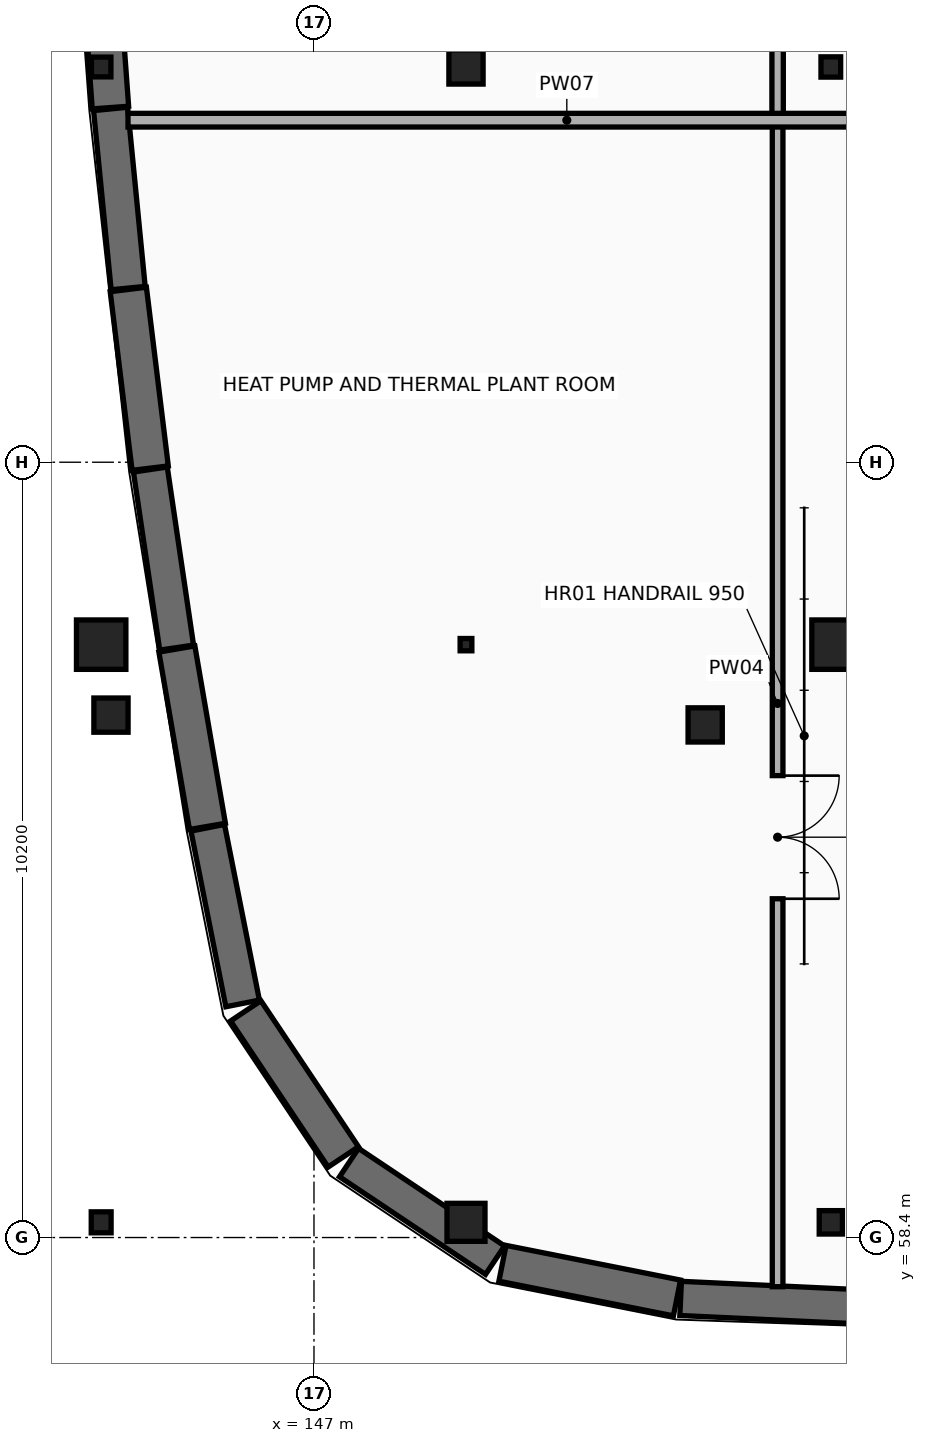
"""IFC4 building model, lengths in metres.
Left out: names, types, materials, properties, quantities, classifications, styles, units other than length and angle.
Written with IfcOpenShell. Run it as: python <this file> out.ifc"""

import sys

from ifc_helpers import new_model, si_unit, direction, frame, frame_2d, origin, origin_2d, place, context, subcontext, project, spatial, rectangle, i_section, extrude, element, fill, save


model = new_model("IFC4")
c1 = context("Model", 3, precision=1e-05, world=origin(), true_north=direction((0.0, 1.0)))
c2 = subcontext(c1, "Body", "Model", "MODEL_VIEW")
j1 = project(units=[si_unit("LENGTHUNIT", "METRE"), si_unit("PLANEANGLEUNIT", "RADIAN")], contexts=[c1])
p1 = place(None, origin())
s1 = spatial("IfcSite", under=j1, at=p1, CompositionType="ELEMENT")
p2 = place(p1, origin())
s2 = spatial("IfcBuilding", under=s1, at=p2, CompositionType="ELEMENT")
p3 = place(p2, frame((0.0, 0.0, -4.2)))
s3 = spatial("IfcBuildingStorey", under=s2, at=p3, CompositionType="ELEMENT", Elevation=-4.2)
p4 = place(p3, frame((144.2, 58.6, -0.415), z_axis=(0.0, 0.0, 1.0), x_axis=(1.0, 0.0, 0.0)))
e1 = element("IfcColumn", 1, at=p4, inside=s3, PredefinedType="COLUMN", context=c2, shape_type="SweptSolid", body=[
    extrude(i_section(OverallWidth=0.261, OverallDepth=0.276, WebThickness=0.015, FlangeThickness=0.025, at=origin_2d()), origin(), (0.0, 0.0, 1.0), 4.615),
])
p5 = place(p3, frame((144.2, 66.2, -0.415), z_axis=(0.0, 0.0, 1.0), x_axis=(1.0, 0.0, 0.0)))
e2 = element("IfcColumn", 2, at=p5, inside=s3, PredefinedType="COLUMN", context=c2, shape_type="SweptSolid", body=[
    extrude(rectangle(XDim=0.65, YDim=0.65, at=origin_2d()), origin(), (0.0, 0.0, 1.0), 4.615),
])
p6 = place(p3, frame((144.2, 73.8, -0.415), z_axis=(0.0, 0.0, 1.0), x_axis=(1.0, 0.0, 0.0)))
e3 = element("IfcColumn", 3, at=p6, inside=s3, PredefinedType="COLUMN", context=c2, shape_type="SweptSolid", body=[
    extrude(i_section(OverallWidth=0.256, OverallDepth=0.26, WebThickness=0.01, FlangeThickness=0.017, at=origin_2d()), origin(), (0.0, 0.0, 1.0), 4.615),
])
p7 = place(p3, frame((149.0, 58.6, -0.415), z_axis=(0.0, 0.0, 1.0), x_axis=(1.0, 0.0, 0.0)))
e4 = element("IfcColumn", 4, at=p7, inside=s3, PredefinedType="COLUMN", context=c2, shape_type="SweptSolid", body=[
    extrude(rectangle(XDim=0.5, YDim=0.5, at=origin_2d()), origin(), (0.0, 0.0, 1.0), 4.615),
])
p8 = place(p3, frame((149.0, 66.2, -0.415), z_axis=(0.0, 0.0, 1.0), x_axis=(1.0, 0.0, 0.0)))
e5 = element("IfcColumn", 5, at=p8, inside=s3, PredefinedType="COLUMN", context=c2, shape_type="SweptSolid", body=[
    extrude(i_section(OverallWidth=0.154, OverallDepth=0.162, WebThickness=0.008, FlangeThickness=0.011, at=origin_2d()), origin(), (0.0, 0.0, 1.0), 4.615),
])
p9 = place(p3, frame((149.0, 73.8, -0.415), z_axis=(0.0, 0.0, 1.0), x_axis=(1.0, 0.0, 0.0)))
e6 = element("IfcColumn", 6, at=p9, inside=s3, PredefinedType="COLUMN", context=c2, shape_type="SweptSolid", body=[
    extrude(rectangle(XDim=0.45, YDim=0.45, at=origin_2d()), origin(), (0.0, 0.0, 1.0), 4.615),
])
p10 = place(p3, frame((153.8, 58.6, -0.415), z_axis=(0.0, 0.0, 1.0), x_axis=(1.0, 0.0, 0.0)))
e7 = element("IfcColumn", 7, at=p10, inside=s3, PredefinedType="COLUMN", context=c2, shape_type="SweptSolid", body=[
    extrude(i_section(OverallWidth=0.305, OverallDepth=0.308, WebThickness=0.01, FlangeThickness=0.015, at=origin_2d()), origin(), (0.0, 0.0, 1.0), 4.615),
])
p11 = place(p3, frame((153.8, 66.2, -0.415), z_axis=(0.0, 0.0, 1.0), x_axis=(1.0, 0.0, 0.0)))
e8 = element("IfcColumn", 8, at=p11, inside=s3, PredefinedType="COLUMN", context=c2, shape_type="SweptSolid", body=[
    extrude(rectangle(XDim=0.5, YDim=0.65, at=origin_2d()), origin(), (0.0, 0.0, 1.0), 4.615),
])
p12 = place(p3, frame((153.8, 73.8, -0.415), z_axis=(0.0, 0.0, 1.0), x_axis=(1.0, 0.0, 0.0)))
e9 = element("IfcColumn", 9, at=p12, inside=s3, PredefinedType="COLUMN", context=c2, shape_type="SweptSolid", body=[
    extrude(i_section(OverallWidth=0.259, OverallDepth=0.267, WebThickness=0.013, FlangeThickness=0.021, at=origin_2d()), origin(), (0.0, 0.0, 1.0), 4.615),
])
for number, where, z_axis, x_axis in (
    (10, (144.329, 65.273, -0.415), (0.0, 0.0, 1.0), (1.0, 0.0, 0.0)),
    (11, (152.147, 65.144, -0.415), (0.0, 0.0, 1.0), (1.0, 0.0, 0.0)),
):
    element("IfcColumn", number, at=place(p3, frame(where, z_axis=z_axis, x_axis=x_axis)), inside=s3, PredefinedType="COLUMN", context=c2, shape_type="SweptSolid", body=[
        extrude(rectangle(XDim=0.45, YDim=0.45, at=origin_2d()), origin(), (0.0, 0.0, 1.0), 4.615),
    ])
p13 = place(p3, frame((154.11, 57.492, 0.0), z_axis=(0.0, 0.0, 1.0), x_axis=(-0.998902862509, 0.046830238855, 0.0)))
e12 = element("IfcWall", 12, at=p13, inside=s3, PredefinedType="STANDARD", context=c2, shape_type="SweptSolid", body=[
    extrude(rectangle(XDim=2.289, YDim=0.45, at=frame_2d((1.144, 0.0))), origin(), (0.0, 0.0, 1.0), 3.882),
])
p14 = place(p3, frame((144.322, 73.266, 0.0), z_axis=(0.0, 0.0, 1.0), x_axis=(-0.07309318863, 0.997325115384, 0.0)))
e13 = element("IfcWall", 13, at=p14, inside=s3, PredefinedType="STANDARD", context=c2, shape_type="SweptSolid", body=[
    extrude(rectangle(XDim=2.368, YDim=0.48, at=frame_2d((1.184, 0.0))), origin(), (0.0, 0.0, 1.0), 3.882),
])
p15 = place(p3, frame((144.555, 70.891, 0.0), z_axis=(0.0, 0.0, 1.0), x_axis=(-0.097523372714, 0.995233234862, 0.0)))
e14 = element("IfcWall", 14, at=p15, inside=s3, PredefinedType="STANDARD", context=c2, shape_type="SweptSolid", body=[
    extrude(rectangle(XDim=2.368, YDim=0.45, at=frame_2d((1.184, 0.0))), origin(), (0.0, 0.0, 1.0), 3.882),
])
p16 = place(p3, frame((144.845, 68.522, 0.0), z_axis=(0.0, 0.0, 1.0), x_axis=(-0.121624086898, 0.992576234597, 0.0)))
e15 = element("IfcWall", 15, at=p16, inside=s3, PredefinedType="STANDARD", context=c2, shape_type="SweptSolid", body=[
    extrude(rectangle(XDim=2.369, YDim=0.48, at=frame_2d((1.184, 0.0))), origin(), (0.0, 0.0, 1.0), 3.882),
])
p17 = place(p3, frame((145.193, 66.161, 0.0), z_axis=(0.0, 0.0, 1.0), x_axis=(-0.146167599706, 0.989259840889, 0.0)))
e16 = element("IfcWall", 16, at=p17, inside=s3, PredefinedType="STANDARD", context=c2, shape_type="SweptSolid", body=[
    extrude(rectangle(XDim=2.368, YDim=0.45, at=frame_2d((1.184, 0.0))), origin(), (0.0, 0.0, 1.0), 3.882),
])
p18 = place(p3, frame((145.598, 63.809, 0.0), z_axis=(0.0, 0.0, 1.0), x_axis=(-0.169679075886, 0.98549937149, 0.0)))
e17 = element("IfcWall", 17, at=p18, inside=s3, PredefinedType="STANDARD", context=c2, shape_type="SweptSolid", body=[
    extrude(rectangle(XDim=2.368, YDim=0.48, at=frame_2d((1.184, 0.0))), origin(), (0.0, 0.0, 1.0), 3.882),
])
p19 = place(p3, frame((146.061, 61.48, 0.0), z_axis=(0.0, 0.0, 1.0), x_axis=(-0.19480081414, 0.980842822684, 0.0)))
e18 = element("IfcWall", 18, at=p19, inside=s3, PredefinedType="STANDARD", context=c2, shape_type="SweptSolid", body=[
    extrude(rectangle(XDim=2.356, YDim=0.45, at=frame_2d((1.178, 0.0))), origin(), (0.0, 0.0, 1.0), 3.882),
])
p20 = place(p3, frame((147.386, 59.461, 0.0), z_axis=(0.0, 0.0, 1.0), x_axis=(-0.555650747973, 0.831415808291, 0.0)))
e19 = element("IfcWall", 19, at=p20, inside=s3, PredefinedType="STANDARD", context=c2, shape_type="SweptSolid", body=[
    extrude(rectangle(XDim=2.311, YDim=0.48, at=frame_2d((1.155, 0.0))), origin(), (0.0, 0.0, 1.0), 3.882),
])
p21 = place(p3, frame((149.382, 58.102, 0.0), z_axis=(0.0, 0.0, 1.0), x_axis=(-0.831415808291, 0.555650747973, 0.0)))
e20 = element("IfcWall", 20, at=p21, inside=s3, PredefinedType="STANDARD", context=c2, shape_type="SweptSolid", body=[
    extrude(rectangle(XDim=2.311, YDim=0.45, at=frame_2d((1.155, 0.0))), origin(), (0.0, 0.0, 1.0), 3.882),
])
p22 = place(p3, frame((151.776, 57.605, 0.0), z_axis=(0.0, 0.0, 1.0), x_axis=(-0.980836573739, 0.1948322756, 0.0)))
e21 = element("IfcWall", 21, at=p22, inside=s3, PredefinedType="STANDARD", context=c2, shape_type="SweptSolid", body=[
    extrude(rectangle(XDim=2.341, YDim=0.48, at=frame_2d((1.17, 0.0))), origin(), (0.0, 0.0, 1.0), 3.882),
])
p23 = place(p3, frame((153.1, 73.1, 0.0), z_axis=(0.0, 0.0, 1.0), x_axis=(0.0, -1.0, 0.0)))
e22 = element("IfcWall", 22, at=p23, inside=s3, PredefinedType="PARTITIONING", context=c2, shape_type="SweptSolid", body=[
    extrude(rectangle(XDim=15.347, YDim=0.14, at=frame_2d((7.674, 0.0))), origin(), (0.0, 0.0, 1.0), 3.27),
])
p24 = place(p23, frame((8.623, 0.0, 0.0)))
e23 = element("IfcOpeningElement", 23, at=p24, cuts=e22, PredefinedType="OPENING", context=c2, shape_type="SweptSolid", body=[
    extrude(rectangle(XDim=1.62, YDim=2.32, at=frame_2d((0.81, 1.16))), frame((0.0, 0.08, 0.0), z_axis=(0.0, -1.0, 0.0), x_axis=(1.0, 0.0, 0.0)), (0.0, 0.0, 1.0), 0.16),
])
p25 = place(p3, frame((153.1, 86.1, 0.0), z_axis=(0.0, 0.0, 1.0), x_axis=(0.0, -1.0, 0.0)))
e24 = element("IfcWall", 24, at=p25, inside=s3, PredefinedType="PARTITIONING", context=c2, shape_type="SweptSolid", body=[
    extrude(rectangle(XDim=13.0, YDim=0.15, at=frame_2d((6.5, 0.0))), origin(), (0.0, 0.0, 1.0), 3.22),
])
p26 = place(p25, frame((6.03, 0.0, 0.0)))
e25 = element("IfcOpeningElement", 25, at=p26, cuts=e24, PredefinedType="OPENING", context=c2, shape_type="SweptSolid", body=[
    extrude(rectangle(XDim=0.94, YDim=2.1, at=frame_2d((0.47, 1.05))), frame((0.0, 0.085, 0.0), z_axis=(0.0, -1.0, 0.0), x_axis=(1.0, 0.0, 0.0)), (0.0, 0.0, 1.0), 0.17),
])
p27 = place(p3, frame((144.553, 73.1, 0.0), z_axis=(0.0, 0.0, 1.0), x_axis=(1.0, 0.0, 0.0)))
e26 = element("IfcWall", 26, at=p27, inside=s3, PredefinedType="PARTITIONING", context=c2, shape_type="SweptSolid", body=[
    extrude(rectangle(XDim=11.547, YDim=0.18, at=frame_2d((5.773, 0.0))), origin(), (0.0, 0.0, 1.0), 3.262),
])
p28 = place(p24, origin())
e27 = element("IfcDoor", 27, at=p28, inside=s3, OperationType="DOUBLE_DOOR_SINGLE_SWING", PredefinedType="DOOR", context=c2, shape_type="SweptSolid", body=[
    extrude(rectangle(XDim=1.62, YDim=2.32, at=frame_2d((0.81, 1.16))), frame((0.0, 0.025, 0.0), z_axis=(0.0, -1.0, 0.0), x_axis=(1.0, 0.0, 0.0)), (0.0, 0.0, 1.0), 0.05),
])
fill(e23, e27)
save(model, sys.argv[1])
